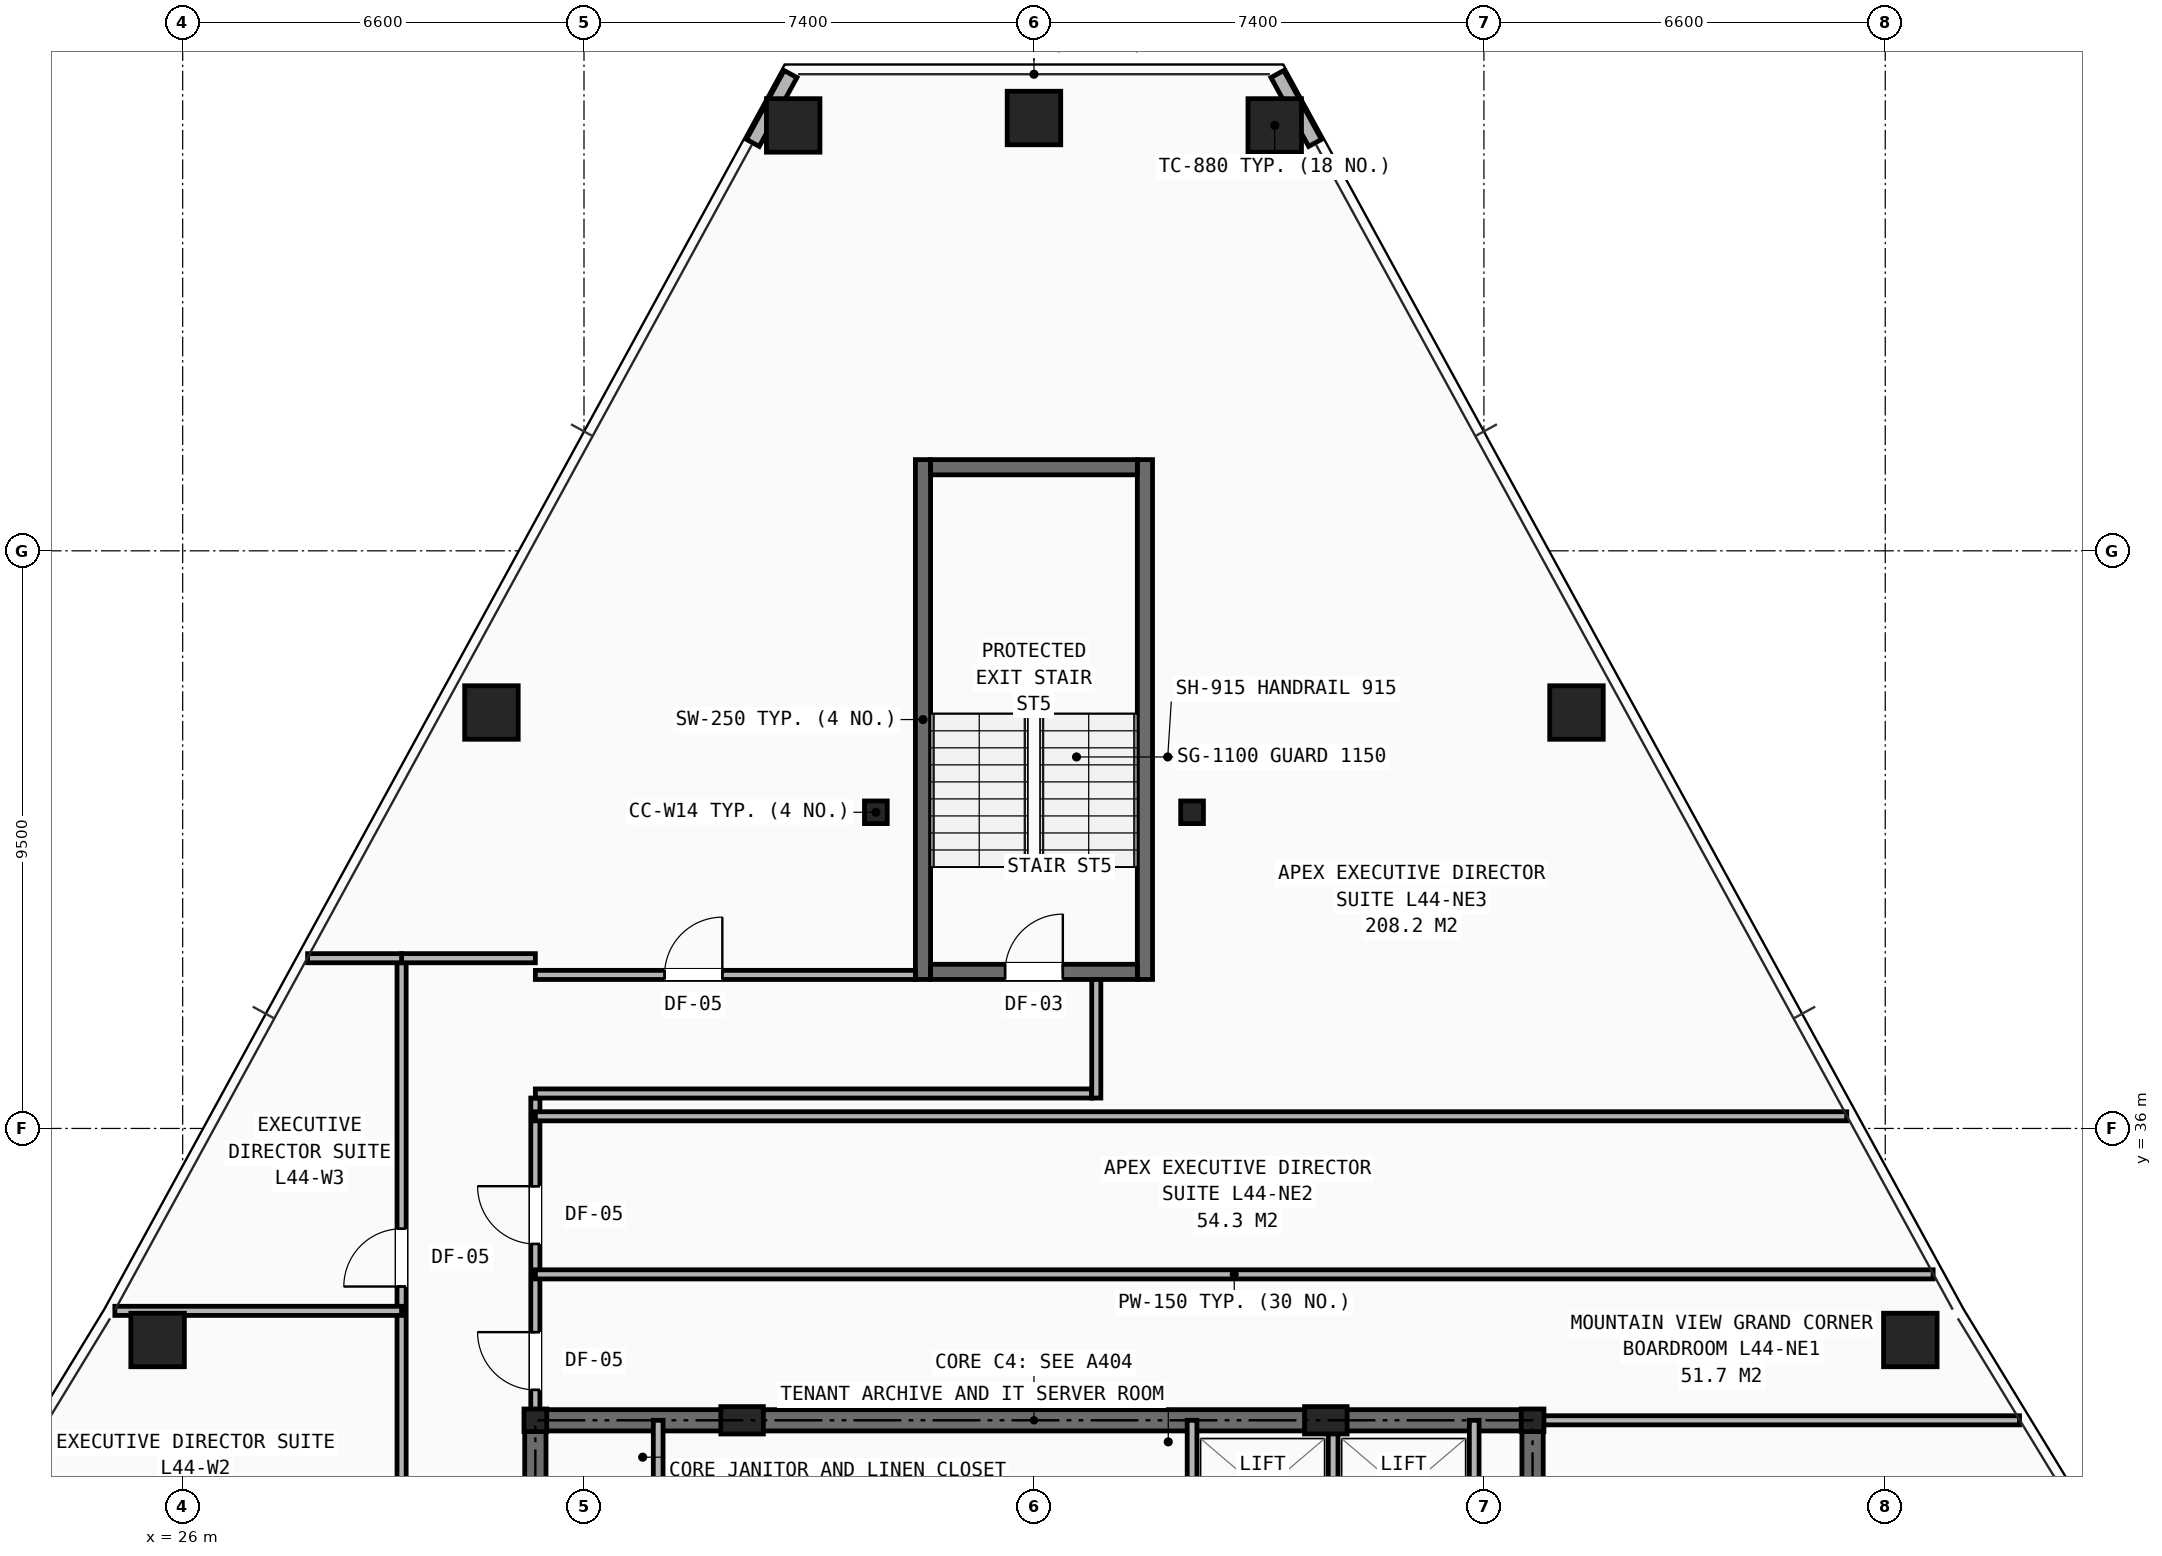
"""IFC4 building model, lengths in metres.
Left out: names, types, materials, properties, quantities, classifications, styles, units other than length and angle.
Written with IfcOpenShell. Run it as: python <this file> out.ifc"""

import sys

from ifc_helpers import new_model, si_unit, direction, frame, frame_2d, origin, origin_2d, place, context, subcontext, project, spatial, rectangle, hollow_rectangle, i_section, extrude, element, fill, save


model = new_model("IFC4")
c1 = context("Model", 3, precision=1e-05, world=origin(), true_north=direction((0.0, 1.0)))
c2 = subcontext(c1, "Body", "Model", "MODEL_VIEW")
j1 = project(units=[si_unit("LENGTHUNIT", "METRE"), si_unit("PLANEANGLEUNIT", "RADIAN")], contexts=[c1])
p1 = place(None, origin())
s1 = spatial("IfcSite", under=j1, at=p1, CompositionType="ELEMENT")
p2 = place(p1, origin())
s2 = spatial("IfcBuilding", under=s1, at=p2, CompositionType="ELEMENT")
p3 = place(p2, frame((0.0, 0.0, 153.95)))
s3 = spatial("IfcBuildingStorey", under=s2, at=p3, CompositionType="ELEMENT", Elevation=153.95)
for number, where, z_axis, x_axis in (
    (1, (31.8, 31.2, 0.0), (0.0, 0.0, 1.0), (1.0, 0.0, 0.0)),
    (2, (48.2, 31.2, 0.0), (0.0, 0.0, 1.0), (1.0, 0.0, 0.0)),
    (3, (37.4, 41.2, 0.0), (0.0, 0.0, 1.0), (1.0, 0.0, 0.0)),
    (4, (42.6, 41.2, 0.0), (0.0, 0.0, 1.0), (1.0, 0.0, 0.0)),
):
    element("IfcColumn", number, at=place(p3, frame(where, z_axis=z_axis, x_axis=x_axis)), inside=s3, PredefinedType="COLUMN", context=c2, shape_type="SweptSolid", body=[
        extrude(i_section(OverallWidth=0.374, OverallDepth=0.372, WebThickness=0.016, FlangeThickness=0.026, at=origin_2d()), origin(), (0.0, 0.0, 1.0), 3.45),
    ])
for number, where, z_axis, x_axis in (
    (5, (35.2, 31.2, 0.0), (0.0, 0.0, 1.0), (1.0, 0.0, 0.0)),
    (6, (44.8, 31.2, 0.0), (0.0, 0.0, 1.0), (1.0, 0.0, 0.0)),
):
    element("IfcColumn", number, at=place(p3, frame(where, z_axis=z_axis, x_axis=x_axis)), inside=s3, PredefinedType="PILASTER", context=c2, shape_type="SweptSolid", body=[
        extrude(rectangle(XDim=0.7, YDim=0.45, at=origin_2d()), origin(), (0.0, 0.0, 1.0), 3.45),
    ])
for number, where, z_axis, x_axis in (
    (7, (43.96, 52.496, 0.0), (0.0, 0.0, 1.0), (1.0, 0.0, 0.0)),
    (8, (40.0, 52.619, 0.0), (0.0, 0.0, 1.0), (1.0, 0.0, 0.0)),
    (9, (36.04, 52.496, 0.0), (0.0, 0.0, 1.0), (1.0, 0.0, 0.0)),
    (10, (31.078, 42.841, 0.0), (0.0, 0.0, 1.0), (1.0, 0.0, 0.0)),
    (11, (25.588, 32.521, 0.0), (0.0, 0.0, 1.0), (1.0, 0.0, 0.0)),
    (12, (54.412, 32.521, 0.0), (0.0, 0.0, 1.0), (1.0, 0.0, 0.0)),
    (13, (48.922, 42.841, 0.0), (0.0, 0.0, 1.0), (1.0, 0.0, 0.0)),
):
    element("IfcColumn", number, at=place(p3, frame(where, z_axis=z_axis, x_axis=x_axis)), inside=s3, PredefinedType="COLUMN", context=c2, shape_type="SweptSolid", body=[
        extrude(hollow_rectangle(XDim=0.88, YDim=0.88, WallThickness=0.06, at=origin_2d()), origin(), (0.0, 0.0, 1.0), 3.45),
    ])
for number, where, z_axis, x_axis in (
    (14, (35.997, 53.342, 0.0), (0.0, 0.0, 1.0), (-0.48, -0.877, 0.0)),
    (15, (44.623, 52.209, 0.0), (0.0, 0.0, 1.0), (-0.48, 0.877, 0.0)),
):
    element("IfcWall", number, at=place(p3, frame(where, z_axis=z_axis, x_axis=x_axis)), inside=s3, PredefinedType="SHEAR", context=c2, shape_type="SweptSolid", body=[
        extrude(rectangle(XDim=1.292, YDim=0.24, at=frame_2d((0.646, 0.0))), origin(), (0.0, 0.0, 1.0), 2.523),
    ])
p4 = place(p3, frame((31.8, 31.2, 0.0), z_axis=(0.0, 0.0, 1.0), x_axis=(1.0, 0.0, 0.0)))
e16 = element("IfcWall", 16, at=p4, inside=s3, PredefinedType="SHEAR", context=c2, shape_type="SweptSolid", body=[
    extrude(rectangle(XDim=16.4, YDim=0.35, at=frame_2d((8.2, 0.0))), origin(), (0.0, 0.0, 1.0), 3.15),
])
p5 = place(p3, frame((31.8, 16.4, 0.0), z_axis=(0.0, 0.0, 1.0), x_axis=(0.0, 1.0, 0.0)))
e17 = element("IfcWall", 17, at=p5, inside=s3, PredefinedType="SHEAR", context=c2, shape_type="SweptSolid", body=[
    extrude(rectangle(XDim=14.8, YDim=0.35, at=frame_2d((7.4, 0.0))), origin(), (0.0, 0.0, 1.0), 3.15),
])
p6 = place(p5, frame((11.0, 0.0, 0.0)))
e18 = element("IfcOpeningElement", 18, at=p6, cuts=e17, PredefinedType="OPENING", context=c2, shape_type="SweptSolid", body=[
    extrude(rectangle(XDim=1.1, YDim=2.15, at=frame_2d((0.55, 1.075))), frame((0.0, 0.185, 0.0), z_axis=(0.0, -1.0, 0.0), x_axis=(1.0, 0.0, 0.0)), (0.0, 0.0, 1.0), 0.37),
])
p7 = place(p3, frame((48.2, 16.4, 0.0), z_axis=(0.0, 0.0, 1.0), x_axis=(0.0, 1.0, 0.0)))
e19 = element("IfcWall", 19, at=p7, inside=s3, PredefinedType="SHEAR", context=c2, shape_type="SweptSolid", body=[
    extrude(rectangle(XDim=14.8, YDim=0.35, at=frame_2d((7.4, 0.0))), origin(), (0.0, 0.0, 1.0), 3.15),
])
p8 = place(p7, frame((11.0, 0.0, 0.0)))
e20 = element("IfcOpeningElement", 20, at=p8, cuts=e19, PredefinedType="OPENING", context=c2, shape_type="SweptSolid", body=[
    extrude(rectangle(XDim=1.1, YDim=2.15, at=frame_2d((0.55, 1.075))), frame((0.0, 0.185, 0.0), z_axis=(0.0, -1.0, 0.0), x_axis=(1.0, 0.0, 0.0)), (0.0, 0.0, 1.0), 0.37),
])
for number, where, z_axis, x_axis in (
    (21, (33.82, 29.02, 0.0), (0.0, 0.0, 1.0), (0.0, 1.0, 0.0)),
    (22, (42.6, 29.02, 0.0), (0.0, 0.0, 1.0), (0.0, 1.0, 0.0)),
    (23, (44.92, 29.02, 0.0), (0.0, 0.0, 1.0), (0.0, 1.0, 0.0)),
    (24, (47.24, 29.02, 0.0), (0.0, 0.0, 1.0), (0.0, 1.0, 0.0)),
):
    element("IfcWall", number, at=place(p3, frame(where, z_axis=z_axis, x_axis=x_axis)), inside=s3, PredefinedType="SOLIDWALL", context=c2, shape_type="SweptSolid", body=[
        extrude(rectangle(XDim=2.18, YDim=0.16, at=frame_2d((1.09, 0.0))), origin(), (0.0, 0.0, 1.0), 2.601),
    ])
p9 = place(p3, frame((29.6, 24.9, 0.0), z_axis=(0.0, 0.0, 1.0), x_axis=(0.0, 1.0, 0.0)))
e25 = element("IfcWall", 25, at=p9, inside=s3, PredefinedType="PARTITIONING", context=c2, shape_type="SweptSolid", body=[
    extrude(rectangle(XDim=13.9, YDim=0.15, at=frame_2d((6.95, 0.0))), origin(), (0.0, 0.0, 1.0), 2.165),
])
p10 = place(p9, frame((0.4, 0.0, 0.0)))
e26 = element("IfcOpeningElement", 26, at=p10, cuts=e25, PredefinedType="OPENING", context=c2, shape_type="SweptSolid", body=[
    extrude(rectangle(XDim=0.95, YDim=2.1, at=frame_2d((0.475, 1.05))), frame((0.0, 0.085, 0.0), z_axis=(0.0, -1.0, 0.0), x_axis=(1.0, 0.0, 0.0)), (0.0, 0.0, 1.0), 0.17),
])
p11 = place(p9, frame((3.5, 0.0, 0.0)))
e27 = element("IfcOpeningElement", 27, at=p11, cuts=e25, PredefinedType="OPENING", context=c2, shape_type="SweptSolid", body=[
    extrude(rectangle(XDim=0.95, YDim=2.1, at=frame_2d((0.475, 1.05))), frame((0.0, 0.085, 0.0), z_axis=(0.0, -1.0, 0.0), x_axis=(1.0, 0.0, 0.0)), (0.0, 0.0, 1.0), 0.17),
])
p12 = place(p9, frame((8.5, 0.0, 0.0)))
e28 = element("IfcOpeningElement", 28, at=p12, cuts=e25, PredefinedType="OPENING", context=c2, shape_type="SweptSolid", body=[
    extrude(rectangle(XDim=0.95, YDim=2.1, at=frame_2d((0.475, 1.05))), frame((0.0, 0.085, 0.0), z_axis=(0.0, -1.0, 0.0), x_axis=(1.0, 0.0, 0.0)), (0.0, 0.0, 1.0), 0.17),
])
p13 = place(p3, frame((31.8, 31.2, 0.0), z_axis=(0.0, 0.0, 1.0), x_axis=(0.0, 1.0, 0.0)))
e29 = element("IfcWall", 29, at=p13, inside=s3, PredefinedType="PARTITIONING", context=c2, shape_type="SweptSolid", body=[
    extrude(rectangle(XDim=5.3, YDim=0.15, at=frame_2d((2.65, 0.0))), origin(), (0.0, 0.0, 1.0), 2.165),
])
p14 = place(p13, frame((0.5, 0.0, 0.0)))
e30 = element("IfcOpeningElement", 30, at=p14, cuts=e29, PredefinedType="OPENING", context=c2, shape_type="SweptSolid", body=[
    extrude(rectangle(XDim=0.95, YDim=2.1, at=frame_2d((0.475, 1.05))), frame((0.0, 0.085, 0.0), z_axis=(0.0, -1.0, 0.0), x_axis=(1.0, 0.0, 0.0)), (0.0, 0.0, 1.0), 0.17),
])
p15 = place(p13, frame((2.9, 0.0, 0.0)))
e31 = element("IfcOpeningElement", 31, at=p15, cuts=e29, PredefinedType="OPENING", context=c2, shape_type="SweptSolid", body=[
    extrude(rectangle(XDim=0.95, YDim=2.1, at=frame_2d((0.475, 1.05))), frame((0.0, 0.085, 0.0), z_axis=(0.0, -1.0, 0.0), x_axis=(1.0, 0.0, 0.0)), (0.0, 0.0, 1.0), 0.17),
])
p16 = place(p3, frame((29.6, 38.8, 0.0), z_axis=(0.0, 0.0, 1.0), x_axis=(1.0, 0.0, 0.0)))
e32 = element("IfcWall", 32, at=p16, inside=s3, PredefinedType="PARTITIONING", context=c2, shape_type="SweptSolid", body=[
    extrude(rectangle(XDim=2.2, YDim=0.15, at=frame_2d((1.1, 0.0))), origin(), (0.0, 0.0, 1.0), 2.683),
])
p17 = place(p3, frame((28.054, 38.8, 0.0), z_axis=(0.0, 0.0, 1.0), x_axis=(1.0, 0.0, 0.0)))
e33 = element("IfcWall", 33, at=p17, inside=s3, PredefinedType="PARTITIONING", context=c2, shape_type="SweptSolid", body=[
    extrude(rectangle(XDim=1.546, YDim=0.15, at=frame_2d((0.773, 0.0))), origin(), (0.0, 0.0, 1.0), 2.529),
])
p18 = place(p3, frame((24.885, 33.0, 0.0), z_axis=(0.0, 0.0, 1.0), x_axis=(1.0, 0.0, 0.0)))
e34 = element("IfcWall", 34, at=p18, inside=s3, PredefinedType="PARTITIONING", context=c2, shape_type="SweptSolid", body=[
    extrude(rectangle(XDim=4.716, YDim=0.15, at=frame_2d((2.358, 0.0))), origin(), (0.0, 0.0, 1.0), 2.529),
])
p19 = place(p3, frame((48.2, 31.2, 0.0), z_axis=(0.0, 0.0, 1.0), x_axis=(1.0, 0.0, 0.0)))
e35 = element("IfcWall", 35, at=p19, inside=s3, PredefinedType="PARTITIONING", context=c2, shape_type="SweptSolid", body=[
    extrude(rectangle(XDim=8.008, YDim=0.15, at=frame_2d((4.004, 0.0))), origin(), (0.0, 0.0, 1.0), 2.165),
])
p20 = place(p3, frame((31.8, 33.6, 0.0), z_axis=(0.0, 0.0, 1.0), x_axis=(1.0, 0.0, 0.0)))
e36 = element("IfcWall", 36, at=p20, inside=s3, PredefinedType="PARTITIONING", context=c2, shape_type="SweptSolid", body=[
    extrude(rectangle(XDim=22.988, YDim=0.15, at=frame_2d((11.494, 0.0))), origin(), (0.0, 0.0, 1.0), 2.529),
])
p21 = place(p3, frame((31.8, 36.2, 0.0), z_axis=(0.0, 0.0, 1.0), x_axis=(1.0, 0.0, 0.0)))
e37 = element("IfcWall", 37, at=p21, inside=s3, PredefinedType="PARTITIONING", context=c2, shape_type="SweptSolid", body=[
    extrude(rectangle(XDim=21.567, YDim=0.15, at=frame_2d((10.783, 0.0))), origin(), (0.0, 0.0, 1.0), 2.529),
])
for number, where, z_axis, x_axis in (
    (38, (38.175, 38.45, 0.0), (0.0, 0.0, 1.0), (0.0, 1.0, 0.0)),
    (39, (41.825, 38.45, 0.0), (0.0, 0.0, 1.0), (0.0, 1.0, 0.0)),
):
    element("IfcWall", number, at=place(p3, frame(where, z_axis=z_axis, x_axis=x_axis)), inside=s3, PredefinedType="SHEAR", context=c2, shape_type="SweptSolid", body=[
        extrude(rectangle(XDim=8.55, YDim=0.25, at=frame_2d((4.275, 0.0))), origin(), (0.0, 0.0, 1.0), 3.15),
    ])
p22 = place(p3, frame((38.3, 38.575, 0.0), z_axis=(0.0, 0.0, 1.0), x_axis=(1.0, 0.0, 0.0)))
e40 = element("IfcWall", 40, at=p22, inside=s3, PredefinedType="SHEAR", context=c2, shape_type="SweptSolid", body=[
    extrude(rectangle(XDim=3.4, YDim=0.25, at=frame_2d((1.7, 0.0))), origin(), (0.0, 0.0, 1.0), 3.15),
])
p23 = place(p22, frame((1.225, 0.0, 0.0)))
e41 = element("IfcOpeningElement", 41, at=p23, cuts=e40, PredefinedType="OPENING", context=c2, shape_type="SweptSolid", body=[
    extrude(rectangle(XDim=0.95, YDim=2.1, at=frame_2d((0.475, 1.05))), frame((0.0, 0.135, 0.0), z_axis=(0.0, -1.0, 0.0), x_axis=(1.0, 0.0, 0.0)), (0.0, 0.0, 1.0), 0.27),
])
p24 = place(p3, frame((38.3, 46.875, 0.0), z_axis=(0.0, 0.0, 1.0), x_axis=(1.0, 0.0, 0.0)))
e42 = element("IfcWall", 42, at=p24, inside=s3, PredefinedType="SHEAR", context=c2, shape_type="SweptSolid", body=[
    extrude(rectangle(XDim=3.4, YDim=0.25, at=frame_2d((1.7, 0.0))), origin(), (0.0, 0.0, 1.0), 3.15),
])
p25 = place(p3, frame((31.8, 36.575, 0.0), z_axis=(0.0, 0.0, 1.0), x_axis=(1.0, 0.0, 0.0)))
e43 = element("IfcWall", 43, at=p25, inside=s3, PredefinedType="PARTITIONING", context=c2, shape_type="SweptSolid", body=[
    extrude(rectangle(XDim=9.15, YDim=0.15, at=frame_2d((4.575, 0.0))), origin(), (0.0, 0.0, 1.0), 3.15),
])
p26 = place(p3, frame((31.8, 38.525, 0.0), z_axis=(0.0, 0.0, 1.0), x_axis=(1.0, 0.0, 0.0)))
e44 = element("IfcWall", 44, at=p26, inside=s3, PredefinedType="PARTITIONING", context=c2, shape_type="SweptSolid", body=[
    extrude(rectangle(XDim=6.25, YDim=0.15, at=frame_2d((3.125, 0.0))), origin(), (0.0, 0.0, 1.0), 2.683),
])
p27 = place(p26, frame((2.125, 0.0, 0.0)))
e45 = element("IfcOpeningElement", 45, at=p27, cuts=e44, PredefinedType="OPENING", context=c2, shape_type="SweptSolid", body=[
    extrude(rectangle(XDim=0.95, YDim=2.1, at=frame_2d((0.475, 1.05))), frame((0.0, 0.085, 0.0), z_axis=(0.0, -1.0, 0.0), x_axis=(1.0, 0.0, 0.0)), (0.0, 0.0, 1.0), 0.17),
])
p28 = place(p3, frame((41.025, 36.5, 0.0), z_axis=(0.0, 0.0, 1.0), x_axis=(0.0, 1.0, 0.0)))
e46 = element("IfcWall", 46, at=p28, inside=s3, PredefinedType="PARTITIONING", context=c2, shape_type="SweptSolid", body=[
    extrude(rectangle(XDim=1.95, YDim=0.15, at=frame_2d((0.975, 0.0))), origin(), (0.0, 0.0, 1.0), 3.15),
])
p29 = place(p12, origin())
e47 = element("IfcDoor", 47, at=p29, inside=s3, OperationType="SINGLE_SWING_LEFT", PredefinedType="DOOR", context=c2, shape_type="SweptSolid", body=[
    extrude(rectangle(XDim=0.95, YDim=2.1, at=frame_2d((0.475, 1.05))), frame((0.0, 0.025, 0.0), z_axis=(0.0, -1.0, 0.0), x_axis=(1.0, 0.0, 0.0)), (0.0, 0.0, 1.0), 0.05),
])
fill(e28, e47)
p30 = place(p14, origin())
e48 = element("IfcDoor", 48, at=p30, inside=s3, OperationType="SINGLE_SWING_RIGHT", PredefinedType="DOOR", context=c2, shape_type="SweptSolid", body=[
    extrude(rectangle(XDim=0.95, YDim=2.1, at=frame_2d((0.475, 1.05))), frame((0.0, 0.025, 0.0), z_axis=(0.0, -1.0, 0.0), x_axis=(1.0, 0.0, 0.0)), (0.0, 0.0, 1.0), 0.05),
])
fill(e30, e48)
p31 = place(p15, origin())
e49 = element("IfcDoor", 49, at=p31, inside=s3, OperationType="SINGLE_SWING_RIGHT", PredefinedType="DOOR", context=c2, shape_type="SweptSolid", body=[
    extrude(rectangle(XDim=0.95, YDim=2.1, at=frame_2d((0.475, 1.05))), frame((0.0, 0.025, 0.0), z_axis=(0.0, -1.0, 0.0), x_axis=(1.0, 0.0, 0.0)), (0.0, 0.0, 1.0), 0.05),
])
fill(e31, e49)
p32 = place(p27, origin())
e50 = element("IfcDoor", 50, at=p32, inside=s3, OperationType="SINGLE_SWING_RIGHT", PredefinedType="DOOR", context=c2, shape_type="SweptSolid", body=[
    extrude(rectangle(XDim=0.95, YDim=2.1, at=frame_2d((0.475, 1.05))), frame((0.0, 0.025, 0.0), z_axis=(0.0, -1.0, 0.0), x_axis=(1.0, 0.0, 0.0)), (0.0, 0.0, 1.0), 0.05),
])
fill(e45, e50)
p33 = place(p23, origin())
e51 = element("IfcDoor", 51, at=p33, inside=s3, OperationType="SINGLE_SWING_RIGHT", PredefinedType="DOOR", context=c2, shape_type="SweptSolid", body=[
    extrude(rectangle(XDim=0.95, YDim=2.1, at=frame_2d((0.475, 1.05))), frame((0.0, 0.025, 0.0), z_axis=(0.0, -1.0, 0.0), x_axis=(1.0, 0.0, 0.0)), (0.0, 0.0, 1.0), 0.05),
])
fill(e41, e51)
save(model, sys.argv[1])
